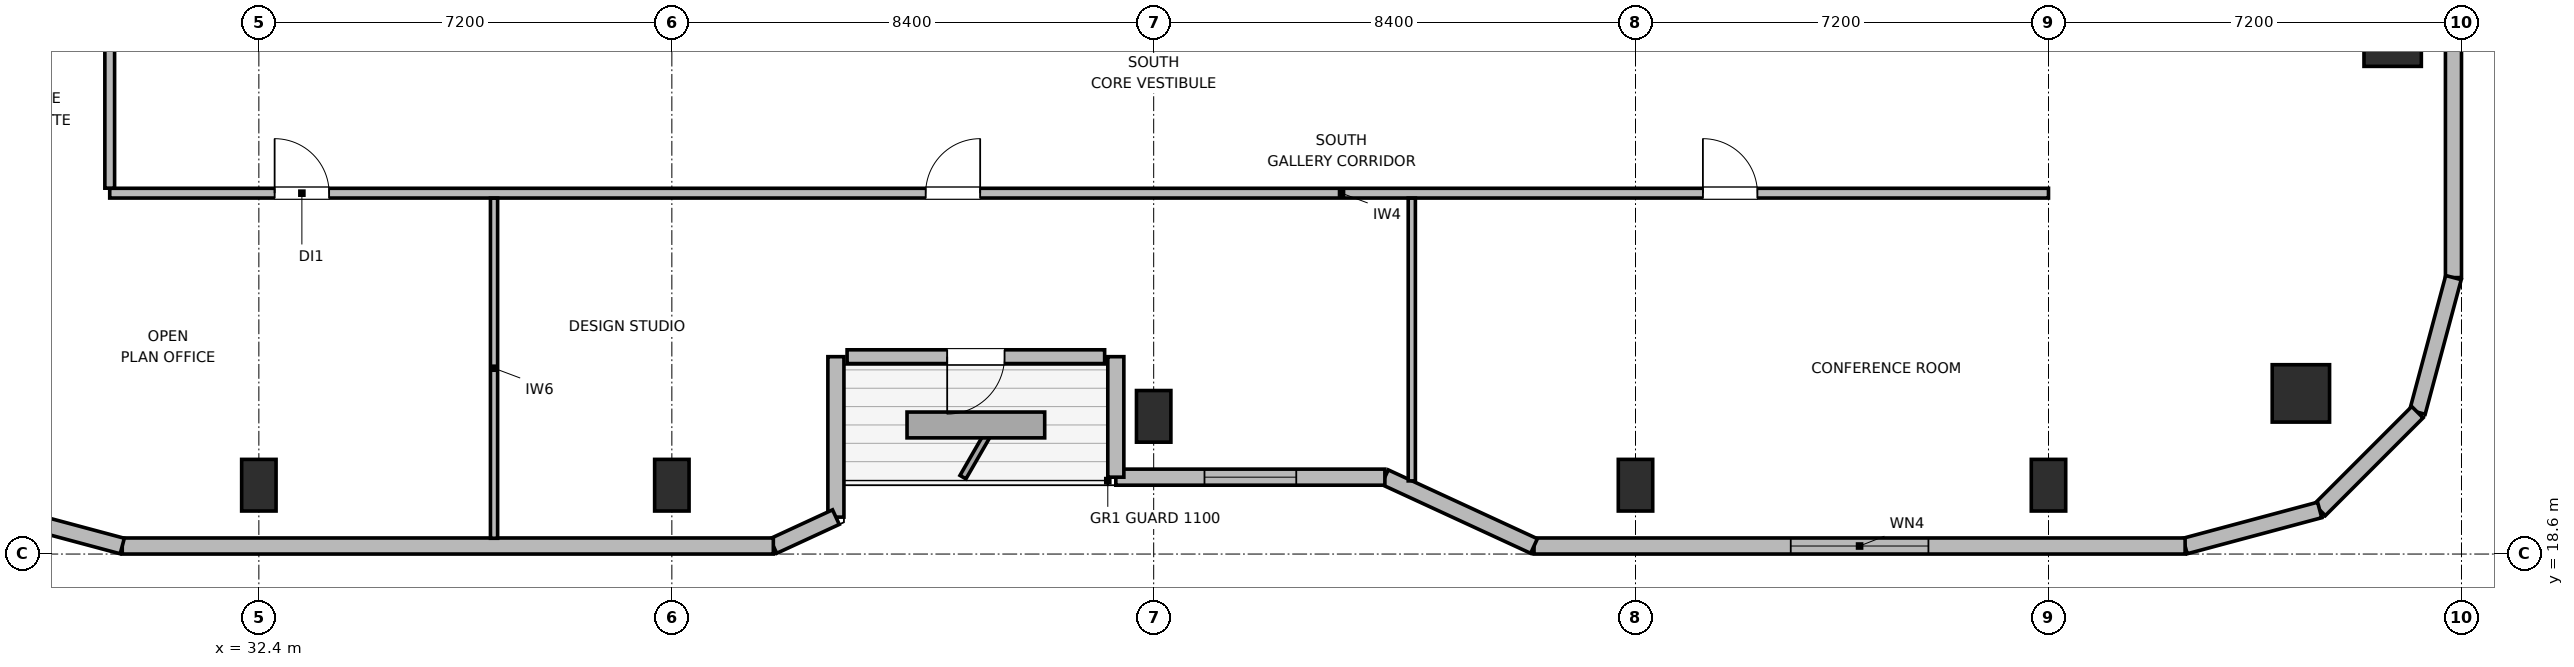
"""IFC4 building model, lengths in metres.
Left out: names, types, materials, properties, quantities, classifications, styles, units other than length and angle.
Written with IfcOpenShell. Run it as: python <this file> out.ifc"""

import sys

from ifc_helpers import new_model, si_unit, direction, frame, frame_2d, origin, origin_2d, place, context, subcontext, project, spatial, rectangle, circle, extrude, element, fill, save


model = new_model("IFC4")
c1 = context("Model", 3, precision=1e-05, world=origin(), true_north=direction((0.0, 1.0)))
c2 = subcontext(c1, "Body", "Model", "MODEL_VIEW")
j1 = project(units=[si_unit("LENGTHUNIT", "METRE"), si_unit("PLANEANGLEUNIT", "RADIAN")], contexts=[c1])
p1 = place(None, origin())
s1 = spatial("IfcSite", under=j1, at=p1, CompositionType="ELEMENT")
p2 = place(p1, origin())
s2 = spatial("IfcBuilding", under=s1, at=p2, CompositionType="ELEMENT")
p3 = place(p2, frame((0.0, 0.0, 262.8)))
s3 = spatial("IfcBuildingStorey", under=s2, at=p3, CompositionType="ELEMENT", Elevation=262.8)
p4 = place(p3, frame((68.0, 21.4, 0.0), z_axis=(0.0, 0.0, 1.0), x_axis=(1.0, 0.0, 0.0)))
e1 = element("IfcColumn", 1, at=p4, inside=s3, PredefinedType="COLUMN", context=c2, shape_type="SweptSolid", body=[
    extrude(circle(Radius=0.5, at=origin_2d()), origin(), (0.0, 0.0, 1.0), 3.9),
])
for number, where, z_axis, x_axis in (
    (2, (32.4, 19.8, 0.0), (0.0, 0.0, 1.0), (1.0, 0.0, 0.0)),
    (3, (39.6, 19.8, 0.0), (0.0, 0.0, 1.0), (1.0, 0.0, 0.0)),
    (4, (48.0, 21.0, 0.0), (0.0, 0.0, 1.0), (1.0, 0.0, 0.0)),
    (5, (56.4, 19.8, 0.0), (0.0, 0.0, 1.0), (1.0, 0.0, 0.0)),
    (6, (63.6, 19.8, 0.0), (0.0, 0.0, 1.0), (1.0, 0.0, 0.0)),
):
    element("IfcColumn", number, at=place(p3, frame(where, z_axis=z_axis, x_axis=x_axis)), inside=s3, PredefinedType="COLUMN", context=c2, shape_type="SweptSolid", body=[
        extrude(rectangle(XDim=0.6, YDim=0.9, at=origin_2d()), origin(), (0.0, 0.0, 1.0), 3.9),
    ])
p5 = place(p3, frame((69.6, 27.6, 0.0), z_axis=(0.0, 0.0, 1.0), x_axis=(1.0, 0.0, 0.0)))
e7 = element("IfcColumn", 7, at=p5, inside=s3, PredefinedType="COLUMN", context=c2, shape_type="SweptSolid", body=[
    extrude(rectangle(XDim=1.0, YDim=1.0, at=origin_2d()), origin(), (0.0, 0.0, 1.0), 3.9),
])
p6 = place(p3, frame((70.66, 37.66, 0.0), z_axis=(0.0, 0.0, 1.0), x_axis=(0.0, -1.0, 0.0)))
e8 = element("IfcWall", 8, at=p6, inside=s3, PredefinedType="SOLIDWALL", context=c2, shape_type="SweptSolid", body=[
    extrude(rectangle(XDim=14.241, YDim=0.28, at=frame_2d((7.121, 0.0))), origin(), (0.0, 0.0, 1.0), 3.68),
])
p7 = place(p6, frame((8.611, 0.0, 0.85)))
e9 = element("IfcOpeningElement", 9, at=p7, cuts=e8, PredefinedType="OPENING", context=c2, shape_type="SweptSolid", body=[
    extrude(rectangle(XDim=1.6, YDim=1.0, at=frame_2d((0.8, 0.5))), frame((0.0, 0.15, 0.0), z_axis=(0.0, -1.0, 0.0), x_axis=(1.0, 0.0, 0.0)), (0.0, 0.0, 1.0), 0.3),
])
p8 = place(p3, frame((70.66, 23.418, 0.0), z_axis=(0.0, 0.0, 1.0), x_axis=(-0.258751159445, -0.965944013639, 0.0)))
e10 = element("IfcWall", 10, at=p8, inside=s3, PredefinedType="SOLIDWALL", context=c2, shape_type="SweptSolid", body=[
    extrude(rectangle(XDim=2.429, YDim=0.28, at=frame_2d((1.214, 0.0))), origin(), (0.0, 0.0, 1.0), 3.68),
])
p9 = place(p3, frame((70.031, 21.073, 0.0), z_axis=(0.0, 0.0, 1.0), x_axis=(-0.707106781187, -0.707106781187, 0.0)))
e11 = element("IfcWall", 11, at=p9, inside=s3, PredefinedType="SOLIDWALL", context=c2, shape_type="SweptSolid", body=[
    extrude(rectangle(XDim=2.41, YDim=0.28, at=frame_2d((1.205, 0.0))), origin(), (0.0, 0.0, 1.0), 3.68),
])
p10 = place(p3, frame((68.327, 19.368, 0.0), z_axis=(0.0, 0.0, 1.0), x_axis=(-0.965937282298, -0.25877628691, 0.0)))
e12 = element("IfcWall", 12, at=p10, inside=s3, PredefinedType="SOLIDWALL", context=c2, shape_type="SweptSolid", body=[
    extrude(rectangle(XDim=2.428, YDim=0.28, at=frame_2d((1.214, 0.0))), origin(), (0.0, 0.0, 1.0), 3.68),
])
p11 = place(p3, frame((65.982, 18.74, 0.0), z_axis=(0.0, 0.0, 1.0), x_axis=(-1.0, 0.0, 0.0)))
e13 = element("IfcWall", 13, at=p11, inside=s3, PredefinedType="SOLIDWALL", context=c2, shape_type="SweptSolid", body=[
    extrude(rectangle(XDim=11.351, YDim=0.28, at=frame_2d((5.676, 0.0))), origin(), (0.0, 0.0, 1.0), 3.68),
])
p12 = place(p11, frame((4.475, 0.0, 0.85)))
e14 = element("IfcOpeningElement", 14, at=p12, cuts=e13, PredefinedType="OPENING", context=c2, shape_type="SweptSolid", body=[
    extrude(rectangle(XDim=2.4, YDim=1.15, at=frame_2d((1.2, 0.575))), frame((0.0, 0.15, 0.0), z_axis=(0.0, -1.0, 0.0), x_axis=(1.0, 0.0, 0.0)), (0.0, 0.0, 1.0), 0.3),
])
p13 = place(p3, frame((54.631, 18.74, 0.0), z_axis=(0.0, 0.0, 1.0), x_axis=(-0.907956889006, 0.419063584324, 0.0)))
e15 = element("IfcWall", 15, at=p13, inside=s3, PredefinedType="SOLIDWALL", context=c2, shape_type="SweptSolid", body=[
    extrude(rectangle(XDim=2.864, YDim=0.28, at=frame_2d((1.432, 0.0))), origin(), (0.0, 0.0, 1.0), 2.265),
])
p14 = place(p3, frame((52.031, 19.94, 0.0), z_axis=(0.0, 0.0, 1.0), x_axis=(-1.0, 0.0, 0.0)))
e16 = element("IfcWall", 16, at=p14, inside=s3, PredefinedType="SOLIDWALL", context=c2, shape_type="SweptSolid", body=[
    extrude(rectangle(XDim=4.691, YDim=0.28, at=frame_2d((2.345, 0.0))), origin(), (0.0, 0.0, 1.0), 2.265),
])
p15 = place(p14, frame((1.545, 0.0, 0.85)))
e17 = element("IfcOpeningElement", 17, at=p15, cuts=e16, PredefinedType="OPENING", context=c2, shape_type="SweptSolid", body=[
    extrude(rectangle(XDim=1.6, YDim=1.0, at=frame_2d((0.8, 0.5))), frame((0.0, 0.15, 0.0), z_axis=(0.0, -1.0, 0.0), x_axis=(1.0, 0.0, 0.0)), (0.0, 0.0, 1.0), 0.3),
])
p16 = place(p3, frame((47.34, 19.94, 0.0), z_axis=(0.0, 0.0, 1.0), x_axis=(0.0, 1.0, 0.0)))
e18 = element("IfcWall", 18, at=p16, inside=s3, PredefinedType="SOLIDWALL", context=c2, shape_type="SweptSolid", body=[
    extrude(rectangle(XDim=2.1, YDim=0.28, at=frame_2d((1.05, 0.0))), origin(), (0.0, 0.0, 1.0), 2.265),
])
p17 = place(p3, frame((47.145, 22.04, 0.0), z_axis=(0.0, 0.0, 1.0), x_axis=(-1.0, 0.0, 0.0)))
e19 = element("IfcWall", 19, at=p17, inside=s3, PredefinedType="SOLIDWALL", context=c2, shape_type="SweptSolid", body=[
    extrude(rectangle(XDim=4.49, YDim=0.24, at=frame_2d((2.245, 0.0))), origin(), (0.0, 0.0, 1.0), 3.68),
])
p18 = place(p17, frame((1.745, 0.0, 0.0)))
e20 = element("IfcOpeningElement", 20, at=p18, cuts=e19, PredefinedType="OPENING", context=c2, shape_type="SweptSolid", body=[
    extrude(rectangle(XDim=1.0, YDim=2.02, at=frame_2d((0.5, 1.01))), frame((0.0, 0.13, 0.0), z_axis=(0.0, -1.0, 0.0), x_axis=(1.0, 0.0, 0.0)), (0.0, 0.0, 1.0), 0.26),
])
p19 = place(p3, frame((42.46, 22.04, 0.0), z_axis=(0.0, 0.0, 1.0), x_axis=(0.0, -1.0, 0.0)))
e21 = element("IfcWall", 21, at=p19, inside=s3, PredefinedType="SOLIDWALL", context=c2, shape_type="SweptSolid", body=[
    extrude(rectangle(XDim=2.796, YDim=0.28, at=frame_2d((1.398, 0.0))), origin(), (0.0, 0.0, 1.0), 2.265),
])
p20 = place(p3, frame((42.46, 19.244, 0.0), z_axis=(0.0, 0.0, 1.0), x_axis=(-0.907893953211, -0.419199916176, 0.0)))
e22 = element("IfcWall", 22, at=p20, inside=s3, PredefinedType="SOLIDWALL", context=c2, shape_type="SweptSolid", body=[
    extrude(rectangle(XDim=1.201, YDim=0.28, at=frame_2d((0.601, 0.0))), origin(), (0.0, 0.0, 1.0), 3.68),
])
p21 = place(p3, frame((41.369, 18.74, 0.0), z_axis=(0.0, 0.0, 1.0), x_axis=(-1.0, 0.0, 0.0)))
e23 = element("IfcWall", 23, at=p21, inside=s3, PredefinedType="SOLIDWALL", context=c2, shape_type="SweptSolid", body=[
    extrude(rectangle(XDim=11.351, YDim=0.28, at=frame_2d((5.675, 0.0))), origin(), (0.0, 0.0, 1.0), 3.68),
])
p22 = place(p3, frame((30.018, 18.74, 0.0), z_axis=(0.0, 0.0, 1.0), x_axis=(-0.965937282298, 0.25877628691, 0.0)))
e24 = element("IfcWall", 24, at=p22, inside=s3, PredefinedType="SOLIDWALL", context=c2, shape_type="SweptSolid", body=[
    extrude(rectangle(XDim=2.428, YDim=0.28, at=frame_2d((1.214, 0.0))), origin(), (0.0, 0.0, 1.0), 3.68),
])
p23 = place(p3, frame((29.8, 24.89, 0.0), z_axis=(0.0, 0.0, 1.0), x_axis=(1.0, 0.0, 0.0)))
e25 = element("IfcWall", 25, at=p23, inside=s3, PredefinedType="PARTITIONING", context=c2, shape_type="SweptSolid", body=[
    extrude(rectangle(XDim=33.8, YDim=0.17, at=frame_2d((16.9, 0.0))), origin(), (0.0, 0.0, 1.0), 3.68),
])
p24 = place(p23, frame((2.875, 0.0, 0.0)))
e26 = element("IfcOpeningElement", 26, at=p24, cuts=e25, PredefinedType="OPENING", context=c2, shape_type="SweptSolid", body=[
    extrude(rectangle(XDim=0.95, YDim=2.04, at=frame_2d((0.475, 1.02))), frame((0.0, 0.095, 0.0), z_axis=(0.0, -1.0, 0.0), x_axis=(1.0, 0.0, 0.0)), (0.0, 0.0, 1.0), 0.19),
])
p25 = place(p23, frame((14.225, 0.0, 0.0)))
e27 = element("IfcOpeningElement", 27, at=p25, cuts=e25, PredefinedType="OPENING", context=c2, shape_type="SweptSolid", body=[
    extrude(rectangle(XDim=0.95, YDim=2.04, at=frame_2d((0.475, 1.02))), frame((0.0, 0.095, 0.0), z_axis=(0.0, -1.0, 0.0), x_axis=(1.0, 0.0, 0.0)), (0.0, 0.0, 1.0), 0.19),
])
p26 = place(p23, frame((27.775, 0.0, 0.0)))
e28 = element("IfcOpeningElement", 28, at=p26, cuts=e25, PredefinedType="OPENING", context=c2, shape_type="SweptSolid", body=[
    extrude(rectangle(XDim=0.95, YDim=2.04, at=frame_2d((0.475, 1.02))), frame((0.0, 0.095, 0.0), z_axis=(0.0, -1.0, 0.0), x_axis=(1.0, 0.0, 0.0)), (0.0, 0.0, 1.0), 0.19),
])
p27 = place(p3, frame((29.8, 24.977, 0.0), z_axis=(0.0, 0.0, 1.0), x_axis=(0.0, 1.0, 0.0)))
e29 = element("IfcWall", 29, at=p27, inside=s3, PredefinedType="PARTITIONING", context=c2, shape_type="SweptSolid", body=[
    extrude(rectangle(XDim=22.046, YDim=0.17, at=frame_2d((11.023, 0.0))), origin(), (0.0, 0.0, 1.0), 3.68),
])
p28 = place(p27, frame((3.693, 0.0, 0.0)))
e30 = element("IfcOpeningElement", 30, at=p28, cuts=e29, PredefinedType="OPENING", context=c2, shape_type="SweptSolid", body=[
    extrude(rectangle(XDim=0.95, YDim=2.04, at=frame_2d((0.475, 1.02))), frame((0.0, 0.095, 0.0), z_axis=(0.0, -1.0, 0.0), x_axis=(1.0, 0.0, 0.0)), (0.0, 0.0, 1.0), 0.19),
])
p29 = place(p27, frame((11.148, 0.0, 0.0)))
e31 = element("IfcOpeningElement", 31, at=p29, cuts=e29, PredefinedType="OPENING", context=c2, shape_type="SweptSolid", body=[
    extrude(rectangle(XDim=0.95, YDim=2.04, at=frame_2d((0.475, 1.02))), frame((0.0, 0.095, 0.0), z_axis=(0.0, -1.0, 0.0), x_axis=(1.0, 0.0, 0.0)), (0.0, 0.0, 1.0), 0.19),
])
p30 = place(p27, frame((18.003, 0.0, 0.0)))
e32 = element("IfcOpeningElement", 32, at=p30, cuts=e29, PredefinedType="OPENING", context=c2, shape_type="SweptSolid", body=[
    extrude(rectangle(XDim=0.95, YDim=2.04, at=frame_2d((0.475, 1.02))), frame((0.0, 0.095, 0.0), z_axis=(0.0, -1.0, 0.0), x_axis=(1.0, 0.0, 0.0)), (0.0, 0.0, 1.0), 0.19),
])
p31 = place(p3, frame((36.5, 18.875, 0.0), z_axis=(0.0, 0.0, 1.0), x_axis=(0.0, 1.0, 0.0)))
e33 = element("IfcWall", 33, at=p31, inside=s3, PredefinedType="PARTITIONING", context=c2, shape_type="SweptSolid", body=[
    extrude(rectangle(XDim=5.928, YDim=0.125, at=frame_2d((2.964, 0.0))), origin(), (0.0, 0.0, 1.0), 3.68),
])
p32 = place(p3, frame((52.5, 19.875, 0.0), z_axis=(0.0, 0.0, 1.0), x_axis=(0.0, 1.0, 0.0)))
e34 = element("IfcWall", 34, at=p32, inside=s3, PredefinedType="PARTITIONING", context=c2, shape_type="SweptSolid", body=[
    extrude(rectangle(XDim=4.928, YDim=0.125, at=frame_2d((2.464, 0.0))), origin(), (0.0, 0.0, 1.0), 3.043),
])
p33 = place(p12, origin())
e35 = element("IfcWindow", 35, at=p33, inside=s3, PartitioningType="SINGLE_PANEL", PredefinedType="WINDOW", context=c2, shape_type="SweptSolid", body=[
    extrude(rectangle(XDim=2.4, YDim=1.15, at=frame_2d((1.2, 0.575))), frame((0.0, 0.03, 0.0), z_axis=(0.0, -1.0, 0.0), x_axis=(1.0, 0.0, 0.0)), (0.0, 0.0, 1.0), 0.06),
])
fill(e14, e35)
p34 = place(p15, origin())
e36 = element("IfcWindow", 36, at=p34, inside=s3, PartitioningType="SINGLE_PANEL", PredefinedType="WINDOW", context=c2, shape_type="SweptSolid", body=[
    extrude(rectangle(XDim=1.6, YDim=1.0, at=frame_2d((0.8, 0.5))), frame((0.0, 0.03, 0.0), z_axis=(0.0, -1.0, 0.0), x_axis=(1.0, 0.0, 0.0)), (0.0, 0.0, 1.0), 0.06),
])
fill(e17, e36)
p35 = place(p18, origin())
e37 = element("IfcDoor", 37, at=p35, inside=s3, OperationType="SINGLE_SWING_RIGHT", PredefinedType="DOOR", context=c2, shape_type="SweptSolid", body=[
    extrude(rectangle(XDim=1.0, YDim=2.02, at=frame_2d((0.5, 1.01))), frame((0.0, 0.025, 0.0), z_axis=(0.0, -1.0, 0.0), x_axis=(1.0, 0.0, 0.0)), (0.0, 0.0, 1.0), 0.05),
])
fill(e20, e37)
p36 = place(p24, origin())
e38 = element("IfcDoor", 38, at=p36, inside=s3, OperationType="SINGLE_SWING_LEFT", PredefinedType="DOOR", context=c2, shape_type="SweptSolid", body=[
    extrude(rectangle(XDim=0.95, YDim=2.04, at=frame_2d((0.475, 1.02))), frame((0.0, 0.025, 0.0), z_axis=(0.0, -1.0, 0.0), x_axis=(1.0, 0.0, 0.0)), (0.0, 0.0, 1.0), 0.05),
])
fill(e26, e38)
p37 = place(p25, origin())
e39 = element("IfcDoor", 39, at=p37, inside=s3, OperationType="SINGLE_SWING_RIGHT", PredefinedType="DOOR", context=c2, shape_type="SweptSolid", body=[
    extrude(rectangle(XDim=0.95, YDim=2.04, at=frame_2d((0.475, 1.02))), frame((0.0, 0.025, 0.0), z_axis=(0.0, -1.0, 0.0), x_axis=(1.0, 0.0, 0.0)), (0.0, 0.0, 1.0), 0.05),
])
fill(e27, e39)
p38 = place(p26, origin())
e40 = element("IfcDoor", 40, at=p38, inside=s3, OperationType="SINGLE_SWING_LEFT", PredefinedType="DOOR", context=c2, shape_type="SweptSolid", body=[
    extrude(rectangle(XDim=0.95, YDim=2.04, at=frame_2d((0.475, 1.02))), frame((0.0, 0.025, 0.0), z_axis=(0.0, -1.0, 0.0), x_axis=(1.0, 0.0, 0.0)), (0.0, 0.0, 1.0), 0.05),
])
fill(e28, e40)
save(model, sys.argv[1])
